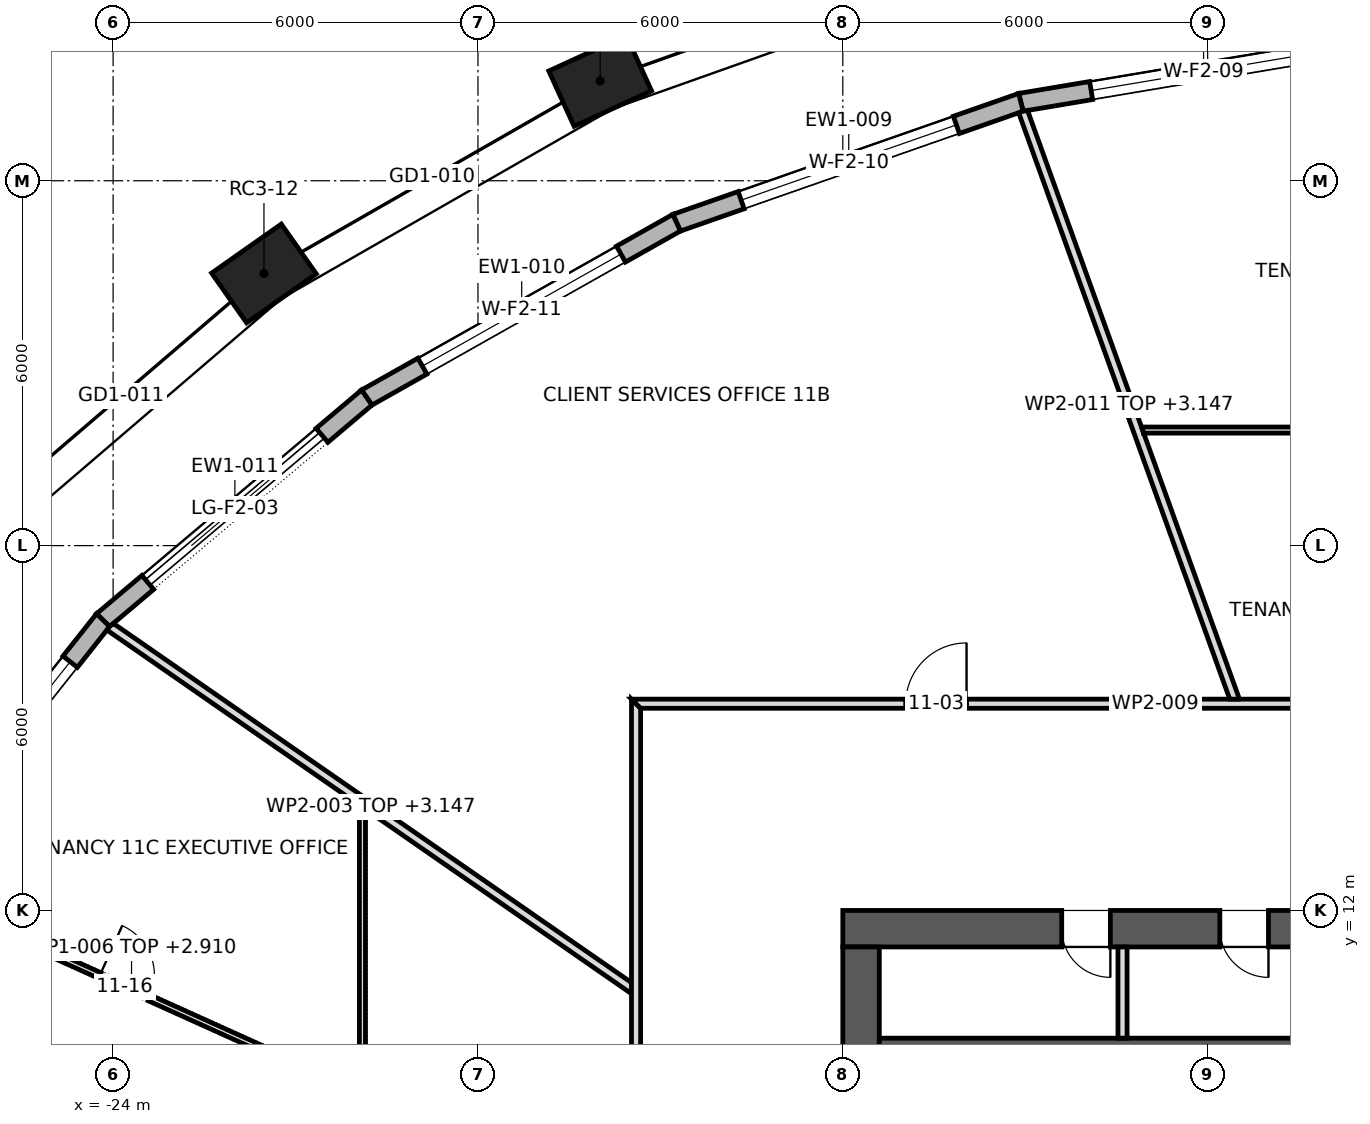
"""IFC4 building model, lengths in metres.
Left out: names, types, materials, properties, quantities, classifications, styles, units other than length and angle.
Written with IfcOpenShell. Run it as: python <this file> out.ifc"""

import sys

from ifc_helpers import new_model, si_unit, direction, frame, frame_2d, origin, origin_2d, place, context, subcontext, project, spatial, polyline, rectangle, outline, extrude, element, fill, save


model = new_model("IFC4")
c1 = context("Model", 3, precision=1e-05, world=origin(), true_north=direction((0.0, 1.0)))
c2 = subcontext(c1, "Body", "Model", "MODEL_VIEW")
j1 = project(units=[si_unit("LENGTHUNIT", "METRE"), si_unit("PLANEANGLEUNIT", "RADIAN")], contexts=[c1])
p1 = place(None, origin())
s1 = spatial("IfcSite", under=j1, at=p1, CompositionType="ELEMENT")
p2 = place(p1, origin())
s2 = spatial("IfcBuilding", under=s1, at=p2, CompositionType="ELEMENT")
p3 = place(p2, frame((0.0, 0.0, 154.9)))
s3 = spatial("IfcBuildingStorey", under=s2, at=p3, CompositionType="ELEMENT", Elevation=154.9)
for number, where, z_axis, x_axis in (
    (1, (-15.99, 25.642, 0.0), (0.0, 0.0, 1.0), (-0.909, -0.417, 0.0)),
    (2, (-21.519, 22.475, 0.0), (0.0, 0.0, 1.0), (-0.818, -0.575, 0.0)),
):
    element("IfcColumn", number, at=place(p3, frame(where, z_axis=z_axis, x_axis=x_axis)), inside=s3, PredefinedType="COLUMN", context=c2, shape_type="SweptSolid", body=[
        extrude(rectangle(XDim=1.4, YDim=1.0, at=origin_2d()), origin(), (0.0, 0.0, 1.0), 4.2),
    ])
p4 = place(p3, frame((-12.0, 11.7, 0.0), z_axis=(0.0, 0.0, 1.0), x_axis=(1.0, 0.0, 0.0)))
e3 = element("IfcWall", 3, at=p4, inside=s3, PredefinedType="SHEAR", context=c2, shape_type="SweptSolid", body=[
    extrude(rectangle(XDim=24.0, YDim=0.6, at=frame_2d((12.0, 0.0))), origin(), (0.0, 0.0, 1.0), 4.2),
])
p5 = place(p4, frame((9.975, 0.0, 0.0)))
e4 = element("IfcOpeningElement", 4, at=p5, cuts=e3, PredefinedType="OPENING", context=c2, shape_type="SweptSolid", body=[
    extrude(rectangle(XDim=0.9, YDim=2.1, at=frame_2d((0.45, 1.05))), frame((0.0, 0.312, 0.0), z_axis=(0.0, -1.0, 0.0), x_axis=(1.0, 0.0, 0.0)), (0.0, 0.0, 1.0), 0.624),
])
p6 = place(p4, frame((3.6, 0.0, 0.0)))
e5 = element("IfcOpeningElement", 5, at=p6, cuts=e3, PredefinedType="OPENING", context=c2, shape_type="SweptSolid", body=[
    extrude(rectangle(XDim=0.8, YDim=2.1, at=frame_2d((0.4, 1.05))), frame((0.0, 0.312, 0.0), z_axis=(0.0, -1.0, 0.0), x_axis=(1.0, 0.0, 0.0)), (0.0, 0.0, 1.0), 0.624),
])
p7 = place(p4, frame((6.2, 0.0, 0.0)))
e6 = element("IfcOpeningElement", 6, at=p7, cuts=e3, PredefinedType="OPENING", context=c2, shape_type="SweptSolid", body=[
    extrude(rectangle(XDim=0.8, YDim=2.1, at=frame_2d((0.4, 1.05))), frame((0.0, 0.312, 0.0), z_axis=(0.0, -1.0, 0.0), x_axis=(1.0, 0.0, 0.0)), (0.0, 0.0, 1.0), 0.624),
])
p8 = place(p4, frame((15.85, 0.0, 0.0)))
e7 = element("IfcOpeningElement", 7, at=p8, cuts=e3, PredefinedType="OPENING", context=c2, shape_type="SweptSolid", body=[
    extrude(rectangle(XDim=0.8, YDim=2.1, at=frame_2d((0.4, 1.05))), frame((0.0, 0.312, 0.0), z_axis=(0.0, -1.0, 0.0), x_axis=(1.0, 0.0, 0.0)), (0.0, 0.0, 1.0), 0.624),
])
p9 = place(p3, frame((-11.7, -11.4, 0.0), z_axis=(0.0, 0.0, 1.0), x_axis=(0.0, 1.0, 0.0)))
e8 = element("IfcWall", 8, at=p9, inside=s3, PredefinedType="SHEAR", context=c2, shape_type="SweptSolid", body=[
    extrude(rectangle(XDim=22.8, YDim=0.6, at=frame_2d((11.4, 0.0))), origin(), (0.0, 0.0, 1.0), 4.2),
])
p10 = place(p9, frame((10.2, 0.0, 0.0)))
e9 = element("IfcOpeningElement", 9, at=p10, cuts=e8, PredefinedType="OPENING", context=c2, shape_type="SweptSolid", body=[
    extrude(rectangle(XDim=2.4, YDim=2.1, at=frame_2d((1.2, 1.05))), frame((0.0, 0.312, 0.0), z_axis=(0.0, -1.0, 0.0), x_axis=(1.0, 0.0, 0.0)), (0.0, 0.0, 1.0), 0.624),
])
p11 = place(p9, frame((18.925, 0.0, 0.0)))
e10 = element("IfcOpeningElement", 10, at=p11, cuts=e8, PredefinedType="OPENING", context=c2, shape_type="SweptSolid", body=[
    extrude(rectangle(XDim=1.2, YDim=2.1, at=frame_2d((0.6, 1.05))), frame((0.0, 0.312, 0.0), z_axis=(0.0, -1.0, 0.0), x_axis=(1.0, 0.0, 0.0)), (0.0, 0.0, 1.0), 0.624),
])
p12 = place(p9, frame((2.675, 0.0, 0.0)))
e11 = element("IfcOpeningElement", 11, at=p12, cuts=e8, PredefinedType="OPENING", context=c2, shape_type="SweptSolid", body=[
    extrude(rectangle(XDim=1.2, YDim=2.1, at=frame_2d((0.6, 1.05))), frame((0.0, 0.312, 0.0), z_axis=(0.0, -1.0, 0.0), x_axis=(1.0, 0.0, 0.0)), (0.0, 0.0, 1.0), 0.624),
])
p13 = place(p3, frame((-3.063, 26.299, 0.0), z_axis=(0.0, 0.0, 1.0), x_axis=(-0.98618955457, -0.165620537547, 0.0)))
e12 = element("IfcWall", 12, at=p13, inside=s3, PredefinedType="STANDARD", context=c2, shape_type="SweptSolid", body=[
    extrude(outline(polyline([(-0.012, -0.15), (6.105, -0.15), (6.08, 0.15), (0.012, 0.15), (-0.012, -0.15)])), origin(), (0.0, 0.0, 1.0), 3.9),
])
p14 = place(p13, frame((1.171, 0.0, 0.6)))
e13 = element("IfcOpeningElement", 13, at=p14, cuts=e12, PredefinedType="OPENING", context=c2, shape_type="SweptSolid", body=[
    extrude(rectangle(XDim=3.75, YDim=2.85, at=frame_2d((1.875, 1.425))), frame((0.0, 0.162, 0.0), z_axis=(0.0, -1.0, 0.0), x_axis=(1.0, 0.0, 0.0)), (0.0, 0.0, 1.0), 0.324),
])
p15 = place(p3, frame((-9.071, 25.29, 0.0), z_axis=(0.0, 0.0, 1.0), x_axis=(-0.943944636678, -0.330103806228, 0.0)))
e14 = element("IfcWall", 14, at=p15, inside=s3, PredefinedType="STANDARD", context=c2, shape_type="SweptSolid", body=[
    extrude(outline(polyline([(-0.013, -0.15), (6.011, -0.15), (5.984, 0.15), (0.013, 0.15), (-0.013, -0.15)])), origin(), (0.0, 0.0, 1.0), 3.9),
])
p16 = place(p15, frame((1.124, 0.0, 0.6)))
e15 = element("IfcOpeningElement", 15, at=p16, cuts=e14, PredefinedType="OPENING", context=c2, shape_type="SweptSolid", body=[
    extrude(rectangle(XDim=3.75, YDim=2.85, at=frame_2d((1.875, 1.425))), frame((0.0, 0.162, 0.0), z_axis=(0.0, -1.0, 0.0), x_axis=(1.0, 0.0, 0.0)), (0.0, 0.0, 1.0), 0.324),
])
p17 = place(p3, frame((-14.732, 23.31, 0.0), z_axis=(0.0, 0.0, 1.0), x_axis=(-0.870982130072, -0.491314694565, 0.0)))
e16 = element("IfcWall", 16, at=p17, inside=s3, PredefinedType="STANDARD", context=c2, shape_type="SweptSolid", body=[
    extrude(outline(polyline([(-0.013, -0.15), (5.866, -0.15), (5.837, 0.15), (0.013, 0.15), (-0.013, -0.15)])), origin(), (0.0, 0.0, 1.0), 3.9),
])
p18 = place(p17, frame((1.051, 0.0, 0.6)))
e17 = element("IfcOpeningElement", 17, at=p18, cuts=e16, PredefinedType="OPENING", context=c2, shape_type="SweptSolid", body=[
    extrude(rectangle(XDim=3.75, YDim=2.85, at=frame_2d((1.875, 1.425))), frame((0.0, 0.162, 0.0), z_axis=(0.0, -1.0, 0.0), x_axis=(1.0, 0.0, 0.0)), (0.0, 0.0, 1.0), 0.324),
])
p19 = place(p3, frame((-19.829, 20.435, 0.0), z_axis=(0.0, 0.0, 1.0), x_axis=(-0.764076096085, -0.645126126732, 0.0)))
e18 = element("IfcWall", 18, at=p19, inside=s3, PredefinedType="STANDARD", context=c2, shape_type="SweptSolid", body=[
    extrude(outline(polyline([(-0.014, -0.15), (5.69, -0.15), (5.66, 0.15), (0.014, 0.15), (-0.014, -0.15)])), origin(), (0.0, 0.0, 1.0), 3.9),
])
p20 = place(p19, frame((0.962, 0.0, 0.0)))
e19 = element("IfcOpeningElement", 19, at=p20, cuts=e18, PredefinedType="OPENING", context=c2, shape_type="SweptSolid", body=[
    extrude(rectangle(XDim=3.75, YDim=3.45, at=frame_2d((1.875, 1.725))), frame((0.0, 0.162, 0.0), z_axis=(0.0, -1.0, 0.0), x_axis=(1.0, 0.0, 0.0)), (0.0, 0.0, 1.0), 0.324),
])
p21 = place(p3, frame((-24.165, 16.774, 0.0), z_axis=(0.0, 0.0, 1.0), x_axis=(-0.620577705153, -0.784144955902, 0.0)))
e20 = element("IfcWall", 20, at=p21, inside=s3, PredefinedType="STANDARD", context=c2, shape_type="SweptSolid", body=[
    extrude(outline(polyline([(-0.015, -0.15), (5.509, -0.15), (5.477, 0.15), (0.015, 0.15), (-0.015, -0.15)])), origin(), (0.0, 0.0, 1.0), 3.9),
])
p22 = place(p21, frame((0.871, 0.0, 0.6)))
e21 = element("IfcOpeningElement", 21, at=p22, cuts=e20, PredefinedType="OPENING", context=c2, shape_type="SweptSolid", body=[
    extrude(rectangle(XDim=3.75, YDim=2.85, at=frame_2d((1.875, 1.425))), frame((0.0, 0.162, 0.0), z_axis=(0.0, -1.0, 0.0), x_axis=(1.0, 0.0, 0.0)), (0.0, 0.0, 1.0), 0.324),
])
p23 = place(p3, frame((-11.4, 9.825, 0.0), z_axis=(0.0, 0.0, 1.0), x_axis=(1.0, 0.0, 0.0)))
e22 = element("IfcWall", 22, at=p23, inside=s3, PredefinedType="SHEAR", context=c2, shape_type="SweptSolid", body=[
    extrude(rectangle(XDim=8.0, YDim=0.15, at=frame_2d((4.0, 0.0))), origin(), (0.0, 0.0, 1.0), 3.9),
])
p24 = place(p3, frame((-7.4, 9.9, 0.0), z_axis=(0.0, 0.0, 1.0), x_axis=(0.0, 1.0, 0.0)))
e23 = element("IfcWall", 23, at=p24, inside=s3, PredefinedType="PARTITIONING", context=c2, shape_type="SweptSolid", body=[
    extrude(rectangle(XDim=1.5, YDim=0.15, at=frame_2d((0.75, 0.0))), origin(), (0.0, 0.0, 1.0), 3.9),
])
p25 = place(p3, frame((-24.059, 16.673, 0.0), z_axis=(0.0, 0.0, 1.0), x_axis=(0.821818585553, -0.569749254006, 0.0)))
e24 = element("IfcWall", 24, at=p25, inside=s3, PredefinedType="PARTITIONING", context=c2, shape_type="SweptSolid", body=[
    extrude(outline(polyline([(0.0, -0.075), (1.724, -0.075), (3.448, -0.075), (5.172, -0.075), (5.173, -0.074), (5.174, -0.075), (6.948, -0.075), (8.723, -0.075), (10.497, -0.075), (10.497, -0.074), (10.394, 0.075), (8.666, 0.075), (6.938, 0.075), (5.209, 0.075), (3.481, 0.075), (1.753, 0.075), (0.025, 0.075), (0.004, -0.002), (0.0, -0.072), (0.0, -0.075)])), origin(), (0.0, 0.0, 1.0), 3.147),
])
p26 = place(p3, frame((-19.9, 1.726, 0.0), z_axis=(0.0, 0.0, 1.0), x_axis=(0.0, 1.0, 0.0)))
e25 = element("IfcWall", 25, at=p26, inside=s3, PredefinedType="PARTITIONING", context=c2, shape_type="SweptSolid", body=[
    extrude(outline(polyline([(0.0, -0.05), (1.99, -0.05), (3.979, -0.05), (5.969, -0.05), (7.959, -0.05), (9.948, -0.05), (11.938, -0.05), (12.007, 0.049), (12.007, 0.05), (10.448, 0.05), (8.89, 0.05), (7.332, 0.05), (7.331, 0.048), (7.326, 0.05), (5.497, 0.05), (3.667, 0.05), (1.838, 0.05), (0.008, 0.05), (0.0, -0.047), (0.0, -0.05)])), origin(), (0.0, 0.0, 1.0), 3.9),
])
p27 = place(p26, frame((3.139, 0.0, 0.0)))
e26 = element("IfcOpeningElement", 26, at=p27, cuts=e25, PredefinedType="OPENING", context=c2, shape_type="SweptSolid", body=[
    extrude(rectangle(XDim=0.9, YDim=2.1, at=frame_2d((0.45, 1.05))), frame((0.0, 0.062, 0.0), z_axis=(0.0, -1.0, 0.0), x_axis=(1.0, 0.0, 0.0)), (0.0, 0.0, 1.0), 0.124),
])
p28 = place(p3, frame((-19.93, 8.993, 0.0), z_axis=(0.0, 0.0, 1.0), x_axis=(-0.911442933079, 0.411426518033, 0.0)))
e27 = element("IfcWall", 27, at=p28, inside=s3, PredefinedType="PARTITIONING", context=c2, shape_type="SweptSolid", body=[
    extrude(outline(polyline([(0.045, -0.05), (1.683, -0.05), (3.321, -0.05), (4.958, -0.05), (6.596, -0.05), (8.234, -0.05), (8.247, 0.0), (8.248, 0.046), (8.248, 0.05), (6.599, 0.05), (4.949, 0.05), (3.299, 0.05), (1.65, 0.05), (0.0, 0.05), (0.0, 0.049), (0.045, -0.05)])), origin(), (0.0, 0.0, 1.0), 2.91),
])
p29 = place(p28, frame((3.807, 0.0, 0.0)))
e28 = element("IfcOpeningElement", 28, at=p29, cuts=e27, PredefinedType="OPENING", context=c2, shape_type="SweptSolid", body=[
    extrude(rectangle(XDim=0.9, YDim=2.1, at=frame_2d((0.45, 1.05))), frame((0.0, 0.062, 0.0), z_axis=(0.0, -1.0, 0.0), x_axis=(1.0, 0.0, 0.0)), (0.0, 0.0, 1.0), 0.124),
])
p30 = place(p3, frame((-15.4, -15.475, 0.0), z_axis=(0.0, 0.0, 1.0), x_axis=(0.0, 1.0, 0.0)))
e29 = element("IfcWall", 29, at=p30, inside=s3, PredefinedType="PARTITIONING", context=c2, shape_type="SweptSolid", body=[
    extrude(outline(polyline([(0.15, -0.075), (2.066, -0.075), (3.981, -0.075), (5.897, -0.075), (7.812, -0.075), (9.728, -0.075), (11.644, -0.075), (13.56, -0.075), (15.475, -0.075), (17.391, -0.075), (19.306, -0.075), (21.222, -0.075), (23.138, -0.075), (25.053, -0.075), (26.969, -0.075), (28.885, -0.075), (30.8, -0.075), (30.95, 0.075), (29.016, 0.075), (27.081, 0.075), (25.147, 0.075), (23.212, 0.075), (21.278, 0.075), (19.344, 0.075), (17.409, 0.075), (15.475, 0.075), (13.541, 0.075), (11.606, 0.075), (9.672, 0.075), (7.738, 0.075), (5.803, 0.075), (3.869, 0.075), (1.935, 0.075), (0.0, 0.075), (0.15, -0.075)])), origin(), (0.0, 0.0, 1.0), 3.9),
])
p31 = place(p30, frame((20.95, 0.0, 0.0)))
e30 = element("IfcOpeningElement", 30, at=p31, cuts=e29, PredefinedType="OPENING", context=c2, shape_type="SweptSolid", body=[
    extrude(rectangle(XDim=1.0, YDim=2.1, at=frame_2d((0.5, 1.05))), frame((0.0, 0.087, 0.0), z_axis=(0.0, -1.0, 0.0), x_axis=(1.0, 0.0, 0.0)), (0.0, 0.0, 1.0), 0.174),
])
p32 = place(p30, frame((13.645, 0.0, 0.0)))
e31 = element("IfcOpeningElement", 31, at=p32, cuts=e29, PredefinedType="OPENING", context=c2, shape_type="SweptSolid", body=[
    extrude(rectangle(XDim=1.0, YDim=2.1, at=frame_2d((0.5, 1.05))), frame((0.0, 0.087, 0.0), z_axis=(0.0, -1.0, 0.0), x_axis=(1.0, 0.0, 0.0)), (0.0, 0.0, 1.0), 0.174),
])
p33 = place(p30, frame((4.905, 0.0, 0.0)))
e32 = element("IfcOpeningElement", 32, at=p33, cuts=e29, PredefinedType="OPENING", context=c2, shape_type="SweptSolid", body=[
    extrude(rectangle(XDim=1.8, YDim=2.1, at=frame_2d((0.9, 1.05))), frame((0.0, 0.087, 0.0), z_axis=(0.0, -1.0, 0.0), x_axis=(1.0, 0.0, 0.0)), (0.0, 0.0, 1.0), 0.174),
])
p34 = place(p3, frame((-15.475, 15.4, 0.0), z_axis=(0.0, 0.0, 1.0), x_axis=(1.0, 0.0, 0.0)))
e33 = element("IfcWall", 33, at=p34, inside=s3, PredefinedType="PARTITIONING", context=c2, shape_type="SweptSolid", body=[
    extrude(outline(polyline([(17.155, 0.075), (15.249, 0.075), (13.343, 0.075), (11.437, 0.075), (9.531, 0.075), (7.625, 0.075), (5.719, 0.075), (3.812, 0.075), (1.906, 0.075), (0.0, 0.075), (0.15, -0.075), (2.04, -0.075), (3.929, -0.075), (5.818, -0.075), (7.708, -0.075), (9.597, -0.075), (11.487, -0.075), (13.376, -0.075), (15.266, -0.075), (17.155, -0.075), (17.155, 0.075)])), origin(), (0.0, 0.0, 1.0), 3.9),
])
p35 = place(p34, frame((13.05, 0.0, 0.0)))
e34 = element("IfcOpeningElement", 34, at=p35, cuts=e33, PredefinedType="OPENING", context=c2, shape_type="SweptSolid", body=[
    extrude(rectangle(XDim=1.0, YDim=2.1, at=frame_2d((0.5, 1.05))), frame((0.0, 0.087, 0.0), z_axis=(0.0, -1.0, 0.0), x_axis=(1.0, 0.0, 0.0)), (0.0, 0.0, 1.0), 0.174),
])
p36 = place(p34, frame((4.51, 0.0, 0.0)))
e35 = element("IfcOpeningElement", 35, at=p36, cuts=e33, PredefinedType="OPENING", context=c2, shape_type="SweptSolid", body=[
    extrude(rectangle(XDim=1.0, YDim=2.1, at=frame_2d((0.5, 1.05))), frame((0.0, 0.087, 0.0), z_axis=(0.0, -1.0, 0.0), x_axis=(1.0, 0.0, 0.0)), (0.0, 0.0, 1.0), 0.174),
])
p37 = place(p3, frame((-9.037, 25.143, 0.0), z_axis=(0.0, 0.0, 1.0), x_axis=(0.338668278724, -0.940905838533, 0.0)))
e36 = element("IfcWall", 36, at=p37, inside=s3, PredefinedType="PARTITIONING", context=c2, shape_type="SweptSolid", body=[
    extrude(outline(polyline([(0.0, -0.075), (1.708, -0.075), (3.416, -0.075), (5.124, -0.075), (6.832, -0.075), (8.541, -0.075), (10.249, -0.075), (10.3, 0.069), (10.3, 0.069), (10.302, 0.074), (10.302, 0.075), (8.752, 0.075), (7.203, 0.075), (5.653, 0.075), (5.653, 0.074), (5.651, 0.075), (3.772, 0.075), (1.893, 0.075), (0.014, 0.075), (0.0, 0.003), (0.0, -0.054), (0.0, -0.075)])), origin(), (0.0, 0.0, 1.0), 3.147),
])
p38 = place(p3, frame((-7.087, 19.9, 0.0), z_axis=(0.0, 0.0, 1.0), x_axis=(1.0, 0.0, 0.0)))
e37 = element("IfcWall", 37, at=p38, inside=s3, PredefinedType="PARTITIONING", context=c2, shape_type="SweptSolid", body=[
    extrude(outline(polyline([(0.036, -0.05), (1.772, -0.05), (3.508, -0.05), (5.245, -0.05), (6.981, -0.05), (8.717, -0.05), (8.717, -0.05), (8.817, -0.05), (8.817, -0.05), (10.591, -0.05), (12.365, -0.05), (14.139, -0.05), (14.175, 0.049), (14.175, 0.05), (12.604, 0.05), (11.034, 0.05), (9.464, 0.05), (9.464, 0.049), (9.454, 0.05), (7.563, 0.05), (5.672, 0.05), (3.781, 0.05), (1.891, 0.05), (0.0, 0.05), (0.0, 0.049), (0.036, -0.05)])), origin(), (0.0, 0.0, 1.0), 3.9),
])
p39 = place(p38, frame((3.903, 0.0, 0.0)))
e38 = element("IfcOpeningElement", 38, at=p39, cuts=e37, PredefinedType="OPENING", context=c2, shape_type="SweptSolid", body=[
    extrude(rectangle(XDim=0.9, YDim=2.1, at=frame_2d((0.45, 1.05))), frame((0.0, 0.062, 0.0), z_axis=(0.0, -1.0, 0.0), x_axis=(1.0, 0.0, 0.0)), (0.0, 0.0, 1.0), 0.124),
])
p40 = place(p38, frame((11.373, 0.0, 0.0)))
e39 = element("IfcOpeningElement", 39, at=p40, cuts=e37, PredefinedType="OPENING", context=c2, shape_type="SweptSolid", body=[
    extrude(rectangle(XDim=0.9, YDim=2.1, at=frame_2d((0.45, 1.05))), frame((0.0, 0.062, 0.0), z_axis=(0.0, -1.0, 0.0), x_axis=(1.0, 0.0, 0.0)), (0.0, 0.0, 1.0), 0.124),
])
p41 = place(p14, origin())
e40 = element("IfcWindow", 40, at=p41, inside=s3, PartitioningType="TRIPLE_PANEL_VERTICAL", PredefinedType="WINDOW", context=c2, shape_type="SweptSolid", body=[
    extrude(rectangle(XDim=3.75, YDim=2.85, at=frame_2d((1.875, 1.425))), frame((0.0, 0.03, 0.0), z_axis=(0.0, -1.0, 0.0), x_axis=(1.0, 0.0, 0.0)), (0.0, 0.0, 1.0), 0.06),
])
fill(e13, e40)
p42 = place(p16, origin())
e41 = element("IfcWindow", 41, at=p42, inside=s3, PartitioningType="TRIPLE_PANEL_VERTICAL", PredefinedType="WINDOW", context=c2, shape_type="SweptSolid", body=[
    extrude(rectangle(XDim=3.75, YDim=2.85, at=frame_2d((1.875, 1.425))), frame((0.0, 0.03, 0.0), z_axis=(0.0, -1.0, 0.0), x_axis=(1.0, 0.0, 0.0)), (0.0, 0.0, 1.0), 0.06),
])
fill(e15, e41)
p43 = place(p18, origin())
e42 = element("IfcWindow", 42, at=p43, inside=s3, PartitioningType="TRIPLE_PANEL_VERTICAL", PredefinedType="WINDOW", context=c2, shape_type="SweptSolid", body=[
    extrude(rectangle(XDim=3.75, YDim=2.85, at=frame_2d((1.875, 1.425))), frame((0.0, 0.03, 0.0), z_axis=(0.0, -1.0, 0.0), x_axis=(1.0, 0.0, 0.0)), (0.0, 0.0, 1.0), 0.06),
])
fill(e17, e42)
p44 = place(p20, origin())
e43 = element("IfcDoor", 43, at=p44, inside=s3, OperationType="DOUBLE_DOOR_SLIDING", PredefinedType="DOOR", context=c2, shape_type="SweptSolid", body=[
    extrude(rectangle(XDim=3.75, YDim=3.45, at=frame_2d((1.875, 1.725))), frame((0.0, 0.025, 0.0), z_axis=(0.0, -1.0, 0.0), x_axis=(1.0, 0.0, 0.0)), (0.0, 0.0, 1.0), 0.05),
])
fill(e19, e43)
p45 = place(p22, origin())
e44 = element("IfcWindow", 44, at=p45, inside=s3, PartitioningType="TRIPLE_PANEL_VERTICAL", PredefinedType="WINDOW", context=c2, shape_type="SweptSolid", body=[
    extrude(rectangle(XDim=3.75, YDim=2.85, at=frame_2d((1.875, 1.425))), frame((0.0, 0.03, 0.0), z_axis=(0.0, -1.0, 0.0), x_axis=(1.0, 0.0, 0.0)), (0.0, 0.0, 1.0), 0.06),
])
fill(e21, e44)
p46 = place(p6, frame((0.8, 0.0, 0.0), z_axis=(0.0, 0.0, 1.0), x_axis=(-1.0, 0.0, 0.0)))
e45 = element("IfcDoor", 45, at=p46, inside=s3, OperationType="SINGLE_SWING_RIGHT", PredefinedType="DOOR", context=c2, shape_type="SweptSolid", body=[
    extrude(rectangle(XDim=0.8, YDim=2.1, at=frame_2d((0.4, 1.05))), frame((0.0, 0.025, 0.0), z_axis=(0.0, -1.0, 0.0), x_axis=(1.0, 0.0, 0.0)), (0.0, 0.0, 1.0), 0.05),
])
fill(e5, e45)
p47 = place(p7, frame((0.8, 0.0, 0.0), z_axis=(0.0, 0.0, 1.0), x_axis=(-1.0, 0.0, 0.0)))
e46 = element("IfcDoor", 46, at=p47, inside=s3, OperationType="SINGLE_SWING_RIGHT", PredefinedType="DOOR", context=c2, shape_type="SweptSolid", body=[
    extrude(rectangle(XDim=0.8, YDim=2.1, at=frame_2d((0.4, 1.05))), frame((0.0, 0.025, 0.0), z_axis=(0.0, -1.0, 0.0), x_axis=(1.0, 0.0, 0.0)), (0.0, 0.0, 1.0), 0.05),
])
fill(e6, e46)
p48 = place(p36, origin())
e47 = element("IfcDoor", 47, at=p48, inside=s3, OperationType="SINGLE_SWING_LEFT", PredefinedType="DOOR", context=c2, shape_type="SweptSolid", body=[
    extrude(rectangle(XDim=1.0, YDim=2.1, at=frame_2d((0.5, 1.05))), frame((0.0, 0.025, 0.0), z_axis=(0.0, -1.0, 0.0), x_axis=(1.0, 0.0, 0.0)), (0.0, 0.0, 1.0), 0.05),
])
fill(e35, e47)
p49 = place(p29, frame((0.9, 0.0, 0.0), z_axis=(0.0, 0.0, 1.0), x_axis=(-1.0, 0.0, 0.0)))
e48 = element("IfcDoor", 48, at=p49, inside=s3, OperationType="SINGLE_SWING_RIGHT", PredefinedType="DOOR", context=c2, shape_type="SweptSolid", body=[
    extrude(rectangle(XDim=0.9, YDim=2.1, at=frame_2d((0.45, 1.05))), frame((0.0, 0.025, 0.0), z_axis=(0.0, -1.0, 0.0), x_axis=(1.0, 0.0, 0.0)), (0.0, 0.0, 1.0), 0.05),
])
fill(e28, e48)
save(model, sys.argv[1])
